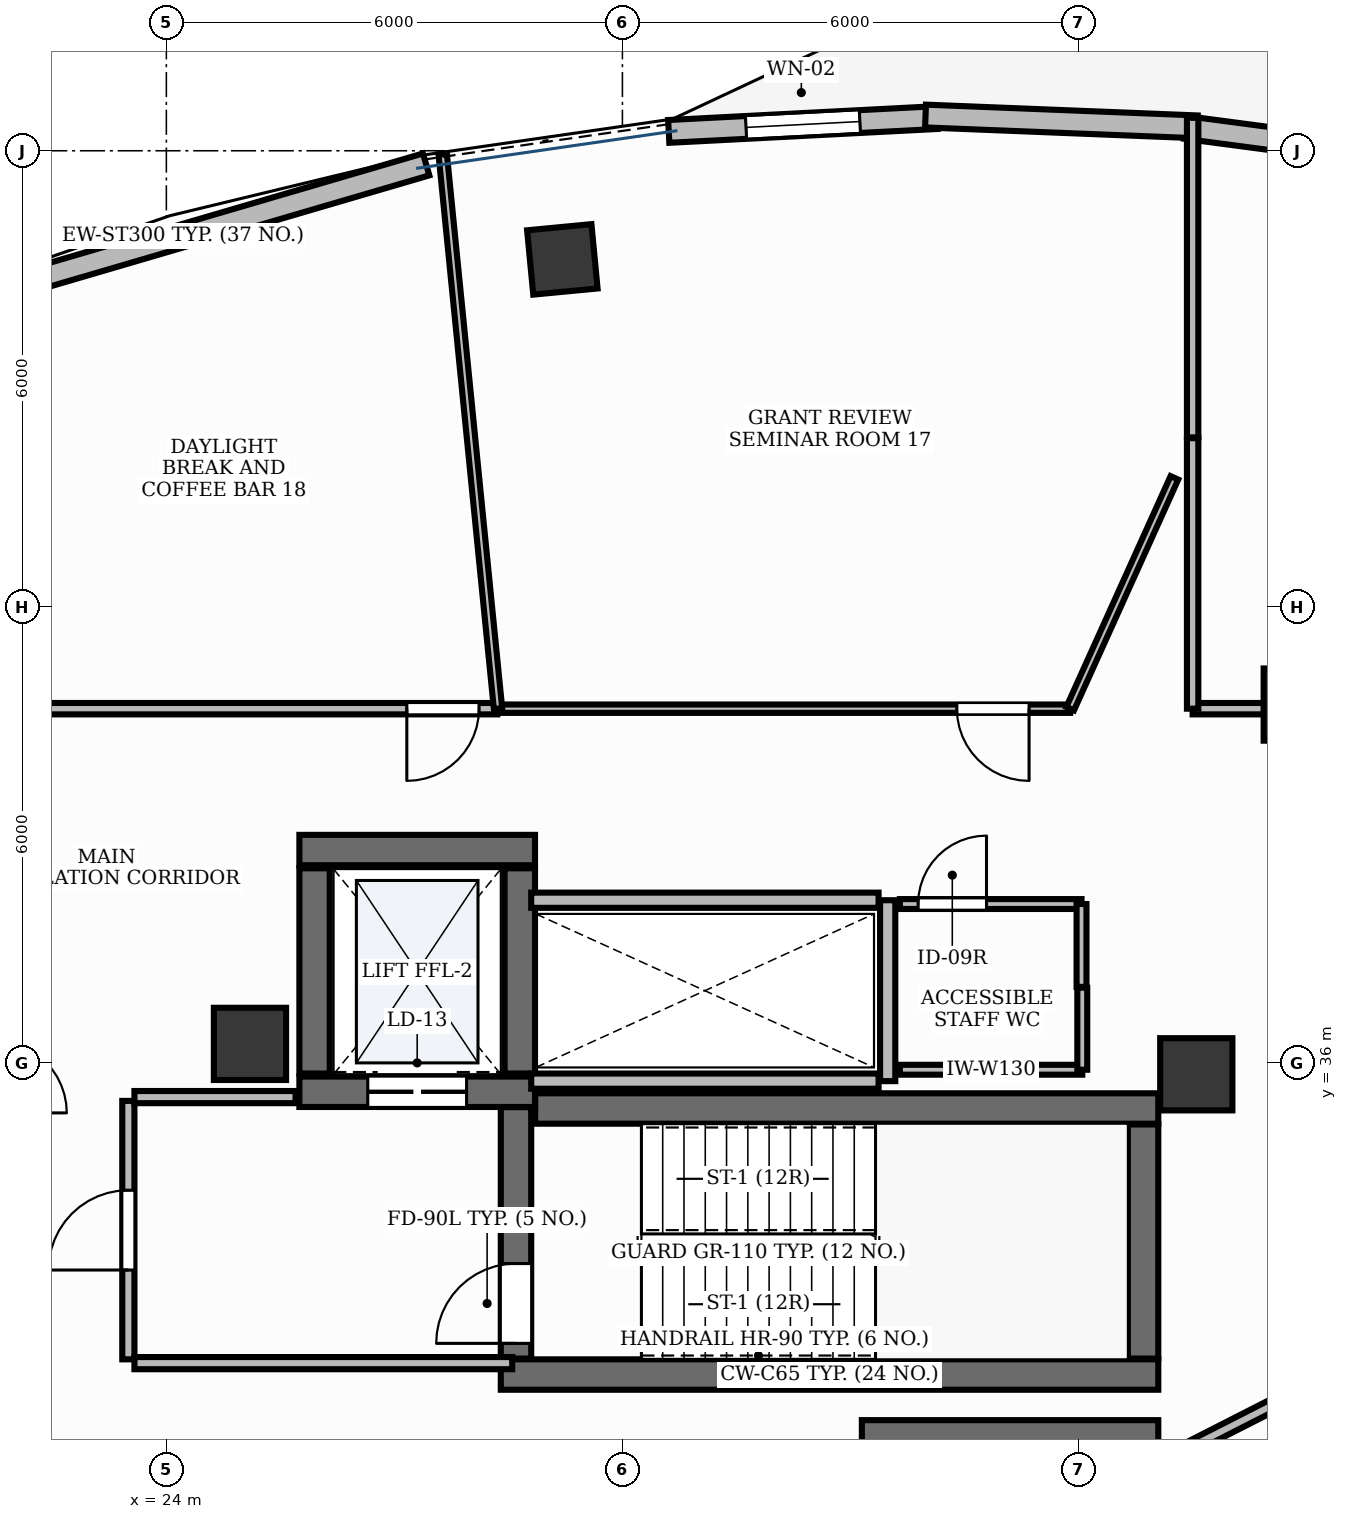
"""IFC4 building model, lengths in metres.
Left out: names, types, materials, properties, quantities, classifications, styles, units other than length and angle.
Written with IfcOpenShell. Run it as: python <this file> out.ifc"""

import sys

from ifc_helpers import new_model, si_unit, direction, frame, frame_2d, origin, origin_2d, place, context, subcontext, project, spatial, rectangle, extrude, element, fill, save


model = new_model("IFC4")
c1 = context("Model", 3, precision=1e-05, world=origin(), true_north=direction((0.0, 1.0)))
c2 = subcontext(c1, "Body", "Model", "MODEL_VIEW")
j1 = project(units=[si_unit("LENGTHUNIT", "METRE"), si_unit("PLANEANGLEUNIT", "RADIAN")], contexts=[c1])
p1 = place(None, origin())
s1 = spatial("IfcSite", under=j1, at=p1, CompositionType="ELEMENT")
p2 = place(p1, origin())
s2 = spatial("IfcBuilding", under=s1, at=p2, CompositionType="ELEMENT")
p3 = place(p2, frame((0.0, 0.0, 252.0)))
s3 = spatial("IfcBuildingStorey", under=s2, at=p3, CompositionType="ELEMENT", Elevation=252.0)
p4 = place(p3, frame((28.852, 35.4, 0.0), z_axis=(0.0, 0.0, 1.0), x_axis=(1.0, 0.0, 0.0)))
e1 = element("IfcWall", 1, at=p4, inside=s3, PredefinedType="SHEAR", context=c2, shape_type="SweptSolid", body=[
    extrude(rectangle(XDim=8.198, YDim=0.4, at=frame_2d((4.099, 0.0))), origin(), (0.0, 0.0, 1.0), 3.9),
])
p5 = place(p3, frame((28.4, 31.9, 0.0), z_axis=(0.0, 0.0, 1.0), x_axis=(1.0, 0.0, 0.0)))
e2 = element("IfcWall", 2, at=p5, inside=s3, PredefinedType="SHEAR", context=c2, shape_type="SweptSolid", body=[
    extrude(rectangle(XDim=8.65, YDim=0.4, at=frame_2d((4.325, 0.0))), origin(), (0.0, 0.0, 1.0), 3.9),
])
p6 = place(p3, frame((36.85, 32.11, 0.0), z_axis=(0.0, 0.0, 1.0), x_axis=(0.0, 1.0, 0.0)))
e3 = element("IfcWall", 3, at=p6, inside=s3, PredefinedType="SHEAR", context=c2, shape_type="SweptSolid", body=[
    extrude(rectangle(XDim=3.08, YDim=0.4, at=frame_2d((1.54, 0.0))), origin(), (0.0, 0.0, 1.0), 3.9),
])
p7 = place(p3, frame((28.6, 32.11, 0.0), z_axis=(0.0, 0.0, 1.0), x_axis=(0.0, 1.0, 0.0)))
e4 = element("IfcWall", 4, at=p7, inside=s3, PredefinedType="SHEAR", context=c2, shape_type="SweptSolid", body=[
    extrude(rectangle(XDim=3.308, YDim=0.4, at=frame_2d((1.654, 0.0))), origin(), (0.0, 0.0, 1.0), 3.9),
])
p8 = place(p7, frame((0.2, 0.0, 0.0)))
e5 = element("IfcOpeningElement", 5, at=p8, cuts=e4, PredefinedType="OPENING", context=c2, shape_type="SweptSolid", body=[
    extrude(rectangle(XDim=1.05, YDim=2.15, at=frame_2d((0.525, 1.075))), frame((0.0, 0.215, 0.0), z_axis=(0.0, -1.0, 0.0), x_axis=(1.0, 0.0, 0.0)), (0.0, 0.0, 1.0), 0.43),
])
p9 = place(p3, frame((33.15, 31.1, 0.0), z_axis=(0.0, 0.0, 1.0), x_axis=(1.0, 0.0, 0.0)))
e6 = element("IfcWall", 6, at=p9, inside=s3, PredefinedType="SHEAR", context=c2, shape_type="SweptSolid", body=[
    extrude(rectangle(XDim=3.9, YDim=0.4, at=frame_2d((1.95, 0.0))), origin(), (0.0, 0.0, 1.0), 3.9),
])
p10 = place(p3, frame((25.75, 38.8, 0.0), z_axis=(0.0, 0.0, 1.0), x_axis=(1.0, 0.0, 0.0)))
e7 = element("IfcWall", 7, at=p10, inside=s3, PredefinedType="SHEAR", context=c2, shape_type="SweptSolid", body=[
    extrude(rectangle(XDim=3.1, YDim=0.4, at=frame_2d((1.55, 0.0))), origin(), (0.0, 0.0, 1.0), 3.9),
])
p11 = place(p3, frame((25.75, 35.62, 0.0), z_axis=(0.0, 0.0, 1.0), x_axis=(1.0, 0.0, 0.0)))
e8 = element("IfcWall", 8, at=p11, inside=s3, PredefinedType="SHEAR", context=c2, shape_type="SweptSolid", body=[
    extrude(rectangle(XDim=3.1, YDim=0.4, at=frame_2d((1.55, 0.0))), origin(), (0.0, 0.0, 1.0), 3.9),
])
p12 = place(p11, frame((0.9, 0.0, 0.0)))
e9 = element("IfcOpeningElement", 9, at=p12, cuts=e8, PredefinedType="OPENING", context=c2, shape_type="SweptSolid", body=[
    extrude(rectangle(XDim=1.3, YDim=2.2, at=frame_2d((0.65, 1.1))), frame((0.0, 0.215, 0.0), z_axis=(0.0, -1.0, 0.0), x_axis=(1.0, 0.0, 0.0)), (0.0, 0.0, 1.0), 0.43),
])
for number, where, z_axis, x_axis in (
    (10, (25.95, 35.86, 0.0), (0.0, 0.0, 1.0), (0.0, 1.0, 0.0)),
    (11, (28.65, 35.86, 0.0), (0.0, 0.0, 1.0), (0.0, 1.0, 0.0)),
):
    element("IfcWall", number, at=place(p3, frame(where, z_axis=z_axis, x_axis=x_axis)), inside=s3, PredefinedType="SHEAR", context=c2, shape_type="SweptSolid", body=[
        extrude(rectangle(XDim=2.7, YDim=0.4, at=frame_2d((1.35, 0.0))), origin(), (0.0, 0.0, 1.0), 3.9),
    ])
for number, where, z_axis, x_axis in (
    (12, (37.55, 35.85, -0.0), (0.0, 0.0, 1.0), (1.0, 0.0, 0.0)),
    (13, (25.1, 36.25, -0.0), (0.0, 0.0, 1.0), (1.0, 0.0, 0.0)),
):
    element("IfcColumn", number, at=place(p3, frame(where, z_axis=z_axis, x_axis=x_axis)), inside=s3, PredefinedType="PILASTER", context=c2, shape_type="SweptSolid", body=[
        extrude(rectangle(XDim=0.95, YDim=0.95, at=origin_2d()), origin(), (0.0, 0.0, 1.0), 3.901),
    ])
p13 = place(p3, frame((38.911, 40.714, -0.0), z_axis=(0.0, 0.0, 1.0), x_axis=(1.0, 0.0, 0.0)))
e14 = element("IfcColumn", 14, at=p13, inside=s3, PredefinedType="COLUMN", context=c2, shape_type="SweptSolid", body=[
    extrude(rectangle(XDim=0.95, YDim=0.95, at=origin_2d()), origin(), (0.0, 0.0, 1.0), 3.901),
])
p14 = place(p3, frame((29.21, 46.571, -0.0), z_axis=(0.0, 0.0, 1.0), x_axis=(0.995462868748, 0.095150811579, 0.0)))
e15 = element("IfcColumn", 15, at=p14, inside=s3, PredefinedType="COLUMN", context=c2, shape_type="SweptSolid", body=[
    extrude(rectangle(XDim=0.85, YDim=0.85, at=origin_2d()), origin(), (0.0, 0.0, 1.0), 3.901),
])
p15 = place(p3, frame((40.896, 47.845, 0.0), z_axis=(0.0, 0.0, 1.0), x_axis=(-0.991363126073, 0.131145538481, 0.0)))
e16 = element("IfcWall", 16, at=p15, inside=s3, PredefinedType="STANDARD", context=c2, shape_type="SweptSolid", body=[
    extrude(rectangle(XDim=3.518, YDim=0.3, at=frame_2d((1.759, 0.0))), origin(), (0.0, 0.0, 1.0), 3.9),
])
p16 = place(p15, frame((1.209, 0.0, 0.0)))
e17 = element("IfcOpeningElement", 17, at=p16, cuts=e16, PredefinedType="OPENING", context=c2, shape_type="SweptSolid", body=[
    extrude(rectangle(XDim=1.1, YDim=2.15, at=frame_2d((0.55, 1.075))), frame((0.0, 0.165, 0.0), z_axis=(0.0, -1.0, 0.0), x_axis=(1.0, 0.0, 0.0)), (0.0, 0.0, 1.0), 0.33),
])
p17 = place(p3, frame((34.141, 48.437, 0.0), z_axis=(0.0, 0.0, 1.0), x_axis=(-0.998669402185, -0.051569614505, 0.0)))
e18 = element("IfcWall", 18, at=p17, inside=s3, PredefinedType="STANDARD", context=c2, shape_type="SweptSolid", body=[
    extrude(rectangle(XDim=3.536, YDim=0.3, at=frame_2d((1.768, 0.0))), origin(), (0.0, 0.0, 1.0), 3.9),
])
p18 = place(p17, frame((1.018, 0.0, 0.95)))
e19 = element("IfcOpeningElement", 19, at=p18, cuts=e18, PredefinedType="OPENING", context=c2, shape_type="SweptSolid", body=[
    extrude(rectangle(XDim=1.5, YDim=1.8, at=frame_2d((0.75, 0.9))), frame((0.0, 0.165, 0.0), z_axis=(0.0, -1.0, 0.0), x_axis=(1.0, 0.0, 0.0)), (0.0, 0.0, 1.0), 0.33),
])
p19 = place(p3, frame((37.563, 48.314, 0.0), z_axis=(0.0, 0.0, 1.0), x_axis=(-0.999208461954, 0.039780014567, 0.0)))
e20 = element("IfcWall", 20, at=p19, inside=s3, PredefinedType="STANDARD", context=c2, shape_type="SweptSolid", body=[
    extrude(rectangle(XDim=3.578, YDim=0.3, at=frame_2d((1.789, 0.0))), origin(), (0.0, 0.0, 1.0), 3.9),
])
p20 = place(p3, frame((27.418, 47.82, 0.0), z_axis=(0.0, 0.0, 1.0), x_axis=(-0.959675502853, -0.281110172749, 0.0)))
e21 = element("IfcWall", 21, at=p20, inside=s3, PredefinedType="STANDARD", context=c2, shape_type="SweptSolid", body=[
    extrude(rectangle(XDim=6.797, YDim=0.3, at=frame_2d((3.398, 0.0))), origin(), (0.0, 0.0, 1.0), 3.47),
])
p21 = place(p3, frame((33.49, 35.76, 0.0), z_axis=(0.0, 0.0, 1.0), x_axis=(0.0, 1.0, 0.0)))
e22 = element("IfcWall", 22, at=p21, inside=s3, PredefinedType="PARTITIONING", context=c2, shape_type="SweptSolid", body=[
    extrude(rectangle(XDim=2.38, YDim=0.2, at=frame_2d((1.19, 0.0))), origin(), (0.0, 0.0, 1.0), 2.91),
])
for number, where, z_axis, x_axis in (
    (23, (28.8, 35.76, 0.0), (0.0, 0.0, 1.0), (1.0, 0.0, 0.0)),
    (24, (28.8, 38.14, 0.0), (0.0, 0.0, 1.0), (1.0, 0.0, 0.0)),
):
    element("IfcWall", number, at=place(p3, frame(where, z_axis=z_axis, x_axis=x_axis)), inside=s3, PredefinedType="PARTITIONING", context=c2, shape_type="SweptSolid", body=[
        extrude(rectangle(XDim=4.57, YDim=0.2, at=frame_2d((2.285, 0.0))), origin(), (0.0, 0.0, 1.0), 2.91),
    ])
p22 = place(p3, frame((23.5, 32.1, 0.0), z_axis=(0.0, 0.0, 1.0), x_axis=(0.0, 1.0, 0.0)))
e25 = element("IfcWall", 25, at=p22, inside=s3, PredefinedType="PARTITIONING", context=c2, shape_type="SweptSolid", body=[
    extrude(rectangle(XDim=3.4, YDim=0.16, at=frame_2d((1.7, 0.0))), origin(), (0.0, 0.0, 1.0), 2.91),
])
p23 = place(p22, frame((1.175, 0.0, 0.0)))
e26 = element("IfcOpeningElement", 26, at=p23, cuts=e25, PredefinedType="OPENING", context=c2, shape_type="SweptSolid", body=[
    extrude(rectangle(XDim=1.05, YDim=2.15, at=frame_2d((0.525, 1.075))), frame((0.0, 0.095, 0.0), z_axis=(0.0, -1.0, 0.0), x_axis=(1.0, 0.0, 0.0)), (0.0, 0.0, 1.0), 0.19),
])
p24 = place(p3, frame((23.58, 32.05, 0.0), z_axis=(0.0, 0.0, 1.0), x_axis=(1.0, 0.0, 0.0)))
e27 = element("IfcWall", 27, at=p24, inside=s3, PredefinedType="PARTITIONING", context=c2, shape_type="SweptSolid", body=[
    extrude(rectangle(XDim=4.97, YDim=0.16, at=frame_2d((2.485, 0.0))), origin(), (0.0, 0.0, 1.0), 2.91),
])
p25 = place(p3, frame((23.58, 35.55, 0.0), z_axis=(0.0, 0.0, 1.0), x_axis=(1.0, 0.0, 0.0)))
e28 = element("IfcWall", 28, at=p25, inside=s3, PredefinedType="PARTITIONING", context=c2, shape_type="SweptSolid", body=[
    extrude(rectangle(XDim=2.12, YDim=0.16, at=frame_2d((1.06, 0.0))), origin(), (0.0, 0.0, 1.0), 2.91),
])
p26 = place(p3, frame((33.65, 38.09, 0.0), z_axis=(0.0, 0.0, 1.0), x_axis=(1.0, 0.0, 0.0)))
e29 = element("IfcWall", 29, at=p26, inside=s3, PredefinedType="PARTITIONING", context=c2, shape_type="SweptSolid", body=[
    extrude(rectangle(XDim=2.39, YDim=0.13, at=frame_2d((1.195, 0.0))), origin(), (0.0, 0.0, 1.0), 2.91),
])
p27 = place(p26, frame((0.24, 0.0, 0.0)))
e30 = element("IfcOpeningElement", 30, at=p27, cuts=e29, PredefinedType="OPENING", context=c2, shape_type="SweptSolid", body=[
    extrude(rectangle(XDim=0.9, YDim=2.15, at=frame_2d((0.45, 1.075))), frame((0.0, 0.08, 0.0), z_axis=(0.0, -1.0, 0.0), x_axis=(1.0, 0.0, 0.0)), (0.0, 0.0, 1.0), 0.16),
])
p28 = place(p3, frame((41.8, 40.66, 0.0), z_axis=(0.0, 0.0, 1.0), x_axis=(-1.0, 0.0, 0.0)))
e31 = element("IfcWall", 31, at=p28, inside=s3, PredefinedType="PARTITIONING", context=c2, shape_type="SweptSolid", body=[
    extrude(rectangle(XDim=4.298, YDim=0.15, at=frame_2d((2.149, 0.0))), origin(), (0.0, 0.0, 1.0), 2.91),
])
p29 = place(p28, frame((0.24, 0.0, 0.0)))
e32 = element("IfcOpeningElement", 32, at=p29, cuts=e31, PredefinedType="OPENING", context=c2, shape_type="SweptSolid", body=[
    extrude(rectangle(XDim=0.95, YDim=2.15, at=frame_2d((0.475, 1.075))), frame((0.0, 0.09, 0.0), z_axis=(0.0, -1.0, 0.0), x_axis=(1.0, 0.0, 0.0)), (0.0, 0.0, 1.0), 0.18),
])
p30 = place(p3, frame((35.891, 40.66, 0.0), z_axis=(0.0, 0.0, 1.0), x_axis=(-1.0, 0.0, 0.0)))
e33 = element("IfcWall", 33, at=p30, inside=s3, PredefinedType="MOVABLE", context=c2, shape_type="SweptSolid", body=[
    extrude(rectangle(XDim=7.527, YDim=0.11, at=frame_2d((3.763, 0.0))), origin(), (0.0, 0.0, 1.0), 2.91),
])
p31 = place(p30, frame((0.541, 0.0, 0.0)))
e34 = element("IfcOpeningElement", 34, at=p31, cuts=e33, PredefinedType="OPENING", context=c2, shape_type="SweptSolid", body=[
    extrude(rectangle(XDim=0.95, YDim=2.15, at=frame_2d((0.475, 1.075))), frame((0.0, 0.07, 0.0), z_axis=(0.0, -1.0, 0.0), x_axis=(1.0, 0.0, 0.0)), (0.0, 0.0, 1.0), 0.14),
])
p32 = place(p3, frame((28.354, 40.66, 0.0), z_axis=(0.0, 0.0, 1.0), x_axis=(-1.0, 0.0, 0.0)))
e35 = element("IfcWall", 35, at=p32, inside=s3, PredefinedType="PARTITIONING", context=c2, shape_type="SweptSolid", body=[
    extrude(rectangle(XDim=6.323, YDim=0.15, at=frame_2d((3.162, 0.0))), origin(), (0.0, 0.0, 1.0), 2.91),
])
p33 = place(p32, frame((0.24, 0.0, 0.0)))
e36 = element("IfcOpeningElement", 36, at=p33, cuts=e35, PredefinedType="OPENING", context=c2, shape_type="SweptSolid", body=[
    extrude(rectangle(XDim=0.95, YDim=2.15, at=frame_2d((0.475, 1.075))), frame((0.0, 0.09, 0.0), z_axis=(0.0, -1.0, 0.0), x_axis=(1.0, 0.0, 0.0)), (0.0, 0.0, 1.0), 0.18),
])
p34 = place(p3, frame((36.05, 35.91, 0.0), z_axis=(0.0, 0.0, 1.0), x_axis=(-1.0, 0.0, 0.0)))
e37 = element("IfcWall", 37, at=p34, inside=s3, PredefinedType="PARTITIONING", context=c2, shape_type="SweptSolid", body=[
    extrude(rectangle(XDim=2.4, YDim=0.13, at=frame_2d((1.2, 0.0))), origin(), (0.0, 0.0, 1.0), 2.91),
])
p35 = place(p3, frame((36.04, 38.09, 0.0), z_axis=(0.0, 0.0, 1.0), x_axis=(0.0, -1.0, 0.0)))
e38 = element("IfcWall", 38, at=p35, inside=s3, PredefinedType="PARTITIONING", context=c2, shape_type="SweptSolid", body=[
    extrude(rectangle(XDim=1.09, YDim=0.13, at=frame_2d((0.545, 0.0))), origin(), (0.0, 0.0, 1.0), 2.91),
])
p36 = place(p3, frame((36.05, 36.99, 0.0), z_axis=(0.0, 0.0, 1.0), x_axis=(0.0, -1.0, 0.0)))
e39 = element("IfcWall", 39, at=p36, inside=s3, PredefinedType="PARTITIONING", context=c2, shape_type="SweptSolid", body=[
    extrude(rectangle(XDim=1.08, YDim=0.13, at=frame_2d((0.54, 0.0))), origin(), (0.0, 0.0, 1.0), 2.91),
])
p37 = place(p3, frame((37.502, 30.96, 0.0), z_axis=(0.0, 0.0, 1.0), x_axis=(0.890920886731, 0.454158533539, 0.0)))
e40 = element("IfcWall", 40, at=p37, inside=s3, PredefinedType="PARTITIONING", context=c2, shape_type="SweptSolid", body=[
    extrude(rectangle(XDim=1.446, YDim=0.16, at=frame_2d((0.723, 0.0))), origin(), (0.0, 0.0, 1.0), 2.91),
])
p38 = place(p3, frame((37.502, 44.229, 0.0), z_axis=(0.0, 0.0, 1.0), x_axis=(0.0, 1.0, 0.0)))
e41 = element("IfcWall", 41, at=p38, inside=s3, PredefinedType="PARTITIONING", context=c2, shape_type="SweptSolid", body=[
    extrude(rectangle(XDim=4.204, YDim=0.15, at=frame_2d((2.102, 0.0))), origin(), (0.0, 0.0, 1.0), 2.91),
])
p39 = place(p3, frame((37.502, 40.66, 0.0), z_axis=(0.0, 0.0, 1.0), x_axis=(0.0, 1.0, 0.0)))
e42 = element("IfcWall", 42, at=p39, inside=s3, PredefinedType="PARTITIONING", context=c2, shape_type="SweptSolid", body=[
    extrude(rectangle(XDim=3.559, YDim=0.15, at=frame_2d((1.78, 0.0))), origin(), (0.0, 0.0, 1.0), 2.91),
])
p40 = place(p3, frame((37.262, 43.697, 0.0), z_axis=(0.0, 0.0, 1.0), x_axis=(-0.411494466198, -0.91141225814, 0.0)))
e43 = element("IfcWall", 43, at=p40, inside=s3, PredefinedType="MOVABLE", context=c2, shape_type="SweptSolid", body=[
    extrude(rectangle(XDim=3.333, YDim=0.11, at=frame_2d((1.666, 0.0))), origin(), (0.0, 0.0, 1.0), 2.91),
])
p41 = place(p3, frame((28.364, 40.66, 0.0), z_axis=(0.0, 0.0, 1.0), x_axis=(-0.09933896822, 0.995053651515, 0.0)))
e44 = element("IfcWall", 44, at=p41, inside=s3, PredefinedType="MOVABLE", context=c2, shape_type="SweptSolid", body=[
    extrude(rectangle(XDim=7.336, YDim=0.11, at=frame_2d((3.668, 0.0))), origin(), (0.0, 0.0, 1.0), 2.91),
])
p42 = place(p18, origin())
e45 = element("IfcWindow", 45, at=p42, inside=s3, PartitioningType="DOUBLE_PANEL_VERTICAL", PredefinedType="WINDOW", context=c2, shape_type="SweptSolid", body=[
    extrude(rectangle(XDim=1.5, YDim=1.8, at=frame_2d((0.75, 0.9))), frame((0.0, 0.03, 0.0), z_axis=(0.0, -1.0, 0.0), x_axis=(1.0, 0.0, 0.0)), (0.0, 0.0, 1.0), 0.06),
])
fill(e19, e45)
p43 = place(p8, origin())
e46 = element("IfcDoor", 46, at=p43, inside=s3, OperationType="SINGLE_SWING_LEFT", PredefinedType="DOOR", context=c2, shape_type="SweptSolid", body=[
    extrude(rectangle(XDim=1.05, YDim=2.15, at=frame_2d((0.525, 1.075))), frame((0.0, 0.025, 0.0), z_axis=(0.0, -1.0, 0.0), x_axis=(1.0, 0.0, 0.0)), (0.0, 0.0, 1.0), 0.05),
])
fill(e5, e46)
p44 = place(p12, origin())
e47 = element("IfcDoor", 47, at=p44, inside=s3, OperationType="DOUBLE_DOOR_SLIDING", PredefinedType="DOOR", context=c2, shape_type="SweptSolid", body=[
    extrude(rectangle(XDim=1.3, YDim=2.2, at=frame_2d((0.65, 1.1))), frame((0.0, 0.025, 0.0), z_axis=(0.0, -1.0, 0.0), x_axis=(1.0, 0.0, 0.0)), (0.0, 0.0, 1.0), 0.05),
])
fill(e9, e47)
p45 = place(p23, origin())
e48 = element("IfcDoor", 48, at=p45, inside=s3, OperationType="SINGLE_SWING_LEFT", PredefinedType="DOOR", context=c2, shape_type="SweptSolid", body=[
    extrude(rectangle(XDim=1.05, YDim=2.15, at=frame_2d((0.525, 1.075))), frame((0.0, 0.025, 0.0), z_axis=(0.0, -1.0, 0.0), x_axis=(1.0, 0.0, 0.0)), (0.0, 0.0, 1.0), 0.05),
])
fill(e26, e48)
p46 = place(p27, origin())
e49 = element("IfcDoor", 49, at=p46, inside=s3, OperationType="SINGLE_SWING_RIGHT", PredefinedType="DOOR", context=c2, shape_type="SweptSolid", body=[
    extrude(rectangle(XDim=0.9, YDim=2.15, at=frame_2d((0.45, 1.075))), frame((0.0, 0.025, 0.0), z_axis=(0.0, -1.0, 0.0), x_axis=(1.0, 0.0, 0.0)), (0.0, 0.0, 1.0), 0.05),
])
fill(e30, e49)
p47 = place(p31, origin())
e50 = element("IfcDoor", 50, at=p47, inside=s3, OperationType="SINGLE_SWING_LEFT", PredefinedType="DOOR", context=c2, shape_type="SweptSolid", body=[
    extrude(rectangle(XDim=0.95, YDim=2.15, at=frame_2d((0.475, 1.075))), frame((0.0, 0.025, 0.0), z_axis=(0.0, -1.0, 0.0), x_axis=(1.0, 0.0, 0.0)), (0.0, 0.0, 1.0), 0.05),
])
fill(e34, e50)
p48 = place(p33, origin())
e51 = element("IfcDoor", 51, at=p48, inside=s3, OperationType="SINGLE_SWING_RIGHT", PredefinedType="DOOR", context=c2, shape_type="SweptSolid", body=[
    extrude(rectangle(XDim=0.95, YDim=2.15, at=frame_2d((0.475, 1.075))), frame((0.0, 0.025, 0.0), z_axis=(0.0, -1.0, 0.0), x_axis=(1.0, 0.0, 0.0)), (0.0, 0.0, 1.0), 0.05),
])
fill(e36, e51)
save(model, sys.argv[1])
